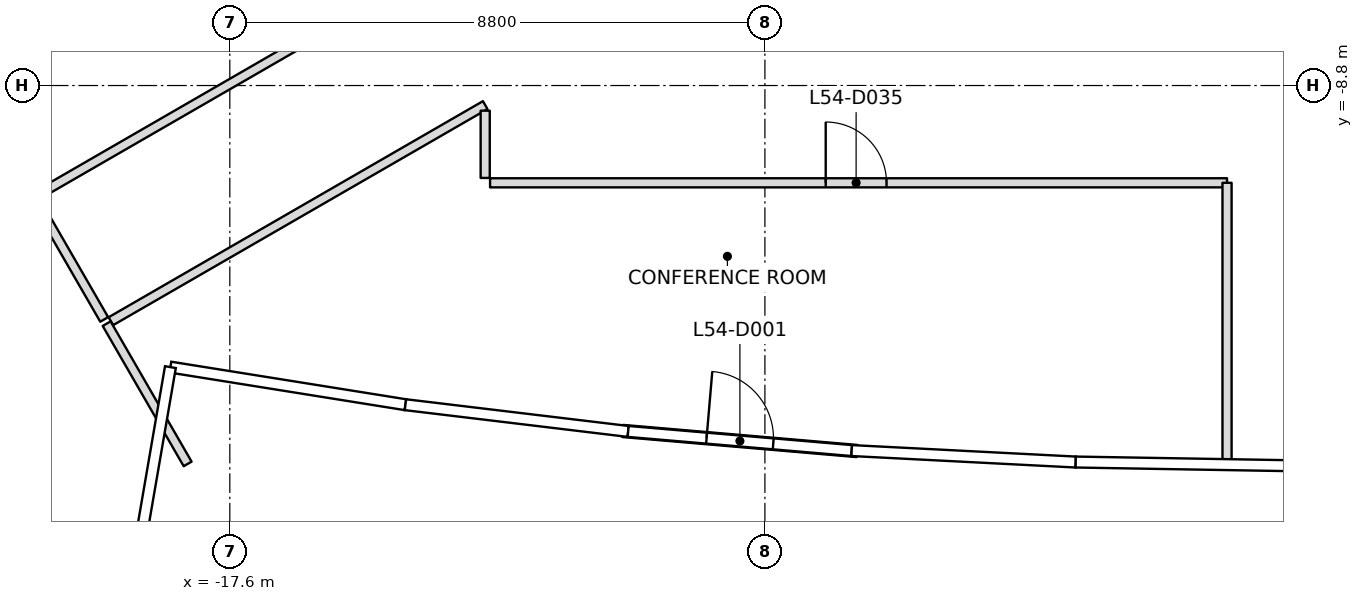
"""IFC4 building model, lengths in metres.
Left out: names, types, materials, properties, quantities, classifications, styles, units other than length and angle.
Written with IfcOpenShell. Run it as: python <this file> out.ifc"""

import sys

from ifc_helpers import new_model, si_unit, direction, frame, frame_2d, origin, place, context, subcontext, project, spatial, rectangle, extrude, element, fill, save


model = new_model("IFC4")
c1 = context("Model", 3, precision=1e-05, world=origin(), true_north=direction((0.0, 1.0)))
c2 = subcontext(c1, "Body", "Model", "MODEL_VIEW")
j1 = project(units=[si_unit("LENGTHUNIT", "METRE"), si_unit("PLANEANGLEUNIT", "RADIAN")], contexts=[c1])
p1 = place(None, origin())
s1 = spatial("IfcSite", under=j1, at=p1, CompositionType="ELEMENT")
p2 = place(p1, origin())
s2 = spatial("IfcBuilding", under=s1, at=p2, CompositionType="ELEMENT")
p3 = place(p2, frame((0.0, 0.0, 243.0)))
s3 = spatial("IfcBuildingStorey", under=s2, at=p3, CompositionType="ELEMENT", Elevation=243.0)
p4 = place(p3, frame((-11.139, -14.481, 0.0), z_axis=(0.0, 0.0, 1.0), x_axis=(0.996360135405, -0.085243654166, 0.0)))
e1 = element("IfcWall", 1, at=p4, inside=s3, PredefinedType="SOLIDWALL", context=c2, shape_type="SweptSolid", body=[
    extrude(rectangle(XDim=3.869, YDim=0.2, at=frame_2d((1.935, 0.0))), origin(), (0.0, 0.0, 1.0), 3.34),
])
p5 = place(p4, frame((1.385, 0.0, 0.0)))
e2 = element("IfcOpeningElement", 2, at=p5, cuts=e1, PredefinedType="OPENING", context=c2, shape_type="SweptSolid", body=[
    extrude(rectangle(XDim=1.1, YDim=2.1, at=frame_2d((0.55, 1.05))), frame((0.0, 0.1, 0.0), z_axis=(0.0, -1.0, 0.0), x_axis=(1.0, 0.0, 0.0)), (0.0, 0.0, 1.0), 0.2),
])
p6 = place(p3, frame((-19.625, -12.717, 0.0), z_axis=(0.0, 0.0, 1.0), x_axis=(0.500002746266, -0.866023818221, 0.0)))
e3 = element("IfcWall", 3, at=p6, inside=s3, PredefinedType="PARTITIONING", context=c2, shape_type="SweptSolid", body=[
    extrude(rectangle(XDim=2.664, YDim=0.15, at=frame_2d((1.332, 0.0))), origin(), (0.0, 0.0, 1.0), 3.45),
])
p7 = place(p3, frame((-20.786, -10.707, 0.0), z_axis=(0.0, 0.0, 1.0), x_axis=(0.500030632641, -0.866007717299, 0.0)))
e4 = element("IfcWall", 4, at=p7, inside=s3, PredefinedType="PARTITIONING", context=c2, shape_type="SweptSolid", body=[
    extrude(rectangle(XDim=2.24, YDim=0.15, at=frame_2d((1.12, 0.0))), origin(), (0.0, 0.0, 1.0), 3.233),
])
p8 = place(p3, frame((-13.4, -6.351, 0.0), z_axis=(0.0, 0.0, 1.0), x_axis=(-0.866034343295, -0.499984515995, 0.0)))
e5 = element("IfcWall", 5, at=p8, inside=s3, PredefinedType="PARTITIONING", context=c2, shape_type="SweptSolid", body=[
    extrude(rectangle(XDim=8.494, YDim=0.15, at=frame_2d((4.247, 0.0))), origin(), (0.0, 0.0, 1.0), 3.317),
])
p9 = place(p3, frame((-19.556, -12.677, 0.0), z_axis=(0.0, 0.0, 1.0), x_axis=(0.866026024469, 0.499998924941, 0.0)))
e6 = element("IfcWall", 6, at=p9, inside=s3, PredefinedType="PARTITIONING", context=c2, shape_type="SweptSolid", body=[
    extrude(rectangle(XDim=7.109, YDim=0.15, at=frame_2d((3.554, 0.0))), origin(), (0.0, 0.0, 1.0), 3.233),
])
p10 = place(p3, frame((-13.4, -9.214, 0.0), z_axis=(0.0, 0.0, 1.0), x_axis=(0.0, -1.0, 0.0)))
e7 = element("IfcWall", 7, at=p10, inside=s3, PredefinedType="PARTITIONING", context=c2, shape_type="SweptSolid", body=[
    extrude(rectangle(XDim=1.106, YDim=0.15, at=frame_2d((0.553, 0.0))), origin(), (0.0, 0.0, 1.0), 3.233),
])
p11 = place(p3, frame((-13.32, -10.4, 0.0), z_axis=(0.0, 0.0, 1.0), x_axis=(1.0, 0.0, 0.0)))
e8 = element("IfcWall", 8, at=p11, inside=s3, PredefinedType="PARTITIONING", context=c2, shape_type="SweptSolid", body=[
    extrude(rectangle(XDim=12.12, YDim=0.15, at=frame_2d((6.06, 0.0))), origin(), (0.0, 0.0, 1.0), 3.317),
])
p12 = place(p11, frame((5.52, 0.0, 0.0)))
e9 = element("IfcOpeningElement", 9, at=p12, cuts=e8, PredefinedType="OPENING", context=c2, shape_type="SweptSolid", body=[
    extrude(rectangle(XDim=1.0, YDim=2.1, at=frame_2d((0.5, 1.05))), frame((0.0, 0.075, 0.0), z_axis=(0.0, -1.0, 0.0), x_axis=(1.0, 0.0, 0.0)), (0.0, 0.0, 1.0), 0.15),
])
p13 = place(p3, frame((-1.2, -10.4, 0.0), z_axis=(0.0, 0.0, 1.0), x_axis=(0.0, -1.0, 0.0)))
e10 = element("IfcWall", 10, at=p13, inside=s3, PredefinedType="PARTITIONING", context=c2, shape_type="SweptSolid", body=[
    extrude(rectangle(XDim=4.645, YDim=0.15, at=frame_2d((2.323, 0.0))), origin(), (0.0, 0.0, 1.0), 3.45),
])
p14 = place(p5, origin())
e11 = element("IfcDoor", 11, at=p14, inside=s3, OperationType="SINGLE_SWING_RIGHT", PredefinedType="DOOR", context=c2, shape_type="SweptSolid", body=[
    extrude(rectangle(XDim=1.1, YDim=2.1, at=frame_2d((0.55, 1.05))), frame((0.0, 0.025, 0.0), z_axis=(0.0, -1.0, 0.0), x_axis=(1.0, 0.0, 0.0)), (0.0, 0.0, 1.0), 0.05),
])
fill(e2, e11)
p15 = place(p12, origin())
e12 = element("IfcDoor", 12, at=p15, inside=s3, OperationType="SINGLE_SWING_LEFT", PredefinedType="DOOR", context=c2, shape_type="SweptSolid", body=[
    extrude(rectangle(XDim=1.0, YDim=2.1, at=frame_2d((0.5, 1.05))), frame((0.0, 0.025, 0.0), z_axis=(0.0, -1.0, 0.0), x_axis=(1.0, 0.0, 0.0)), (0.0, 0.0, 1.0), 0.05),
])
fill(e9, e12)
save(model, sys.argv[1])
